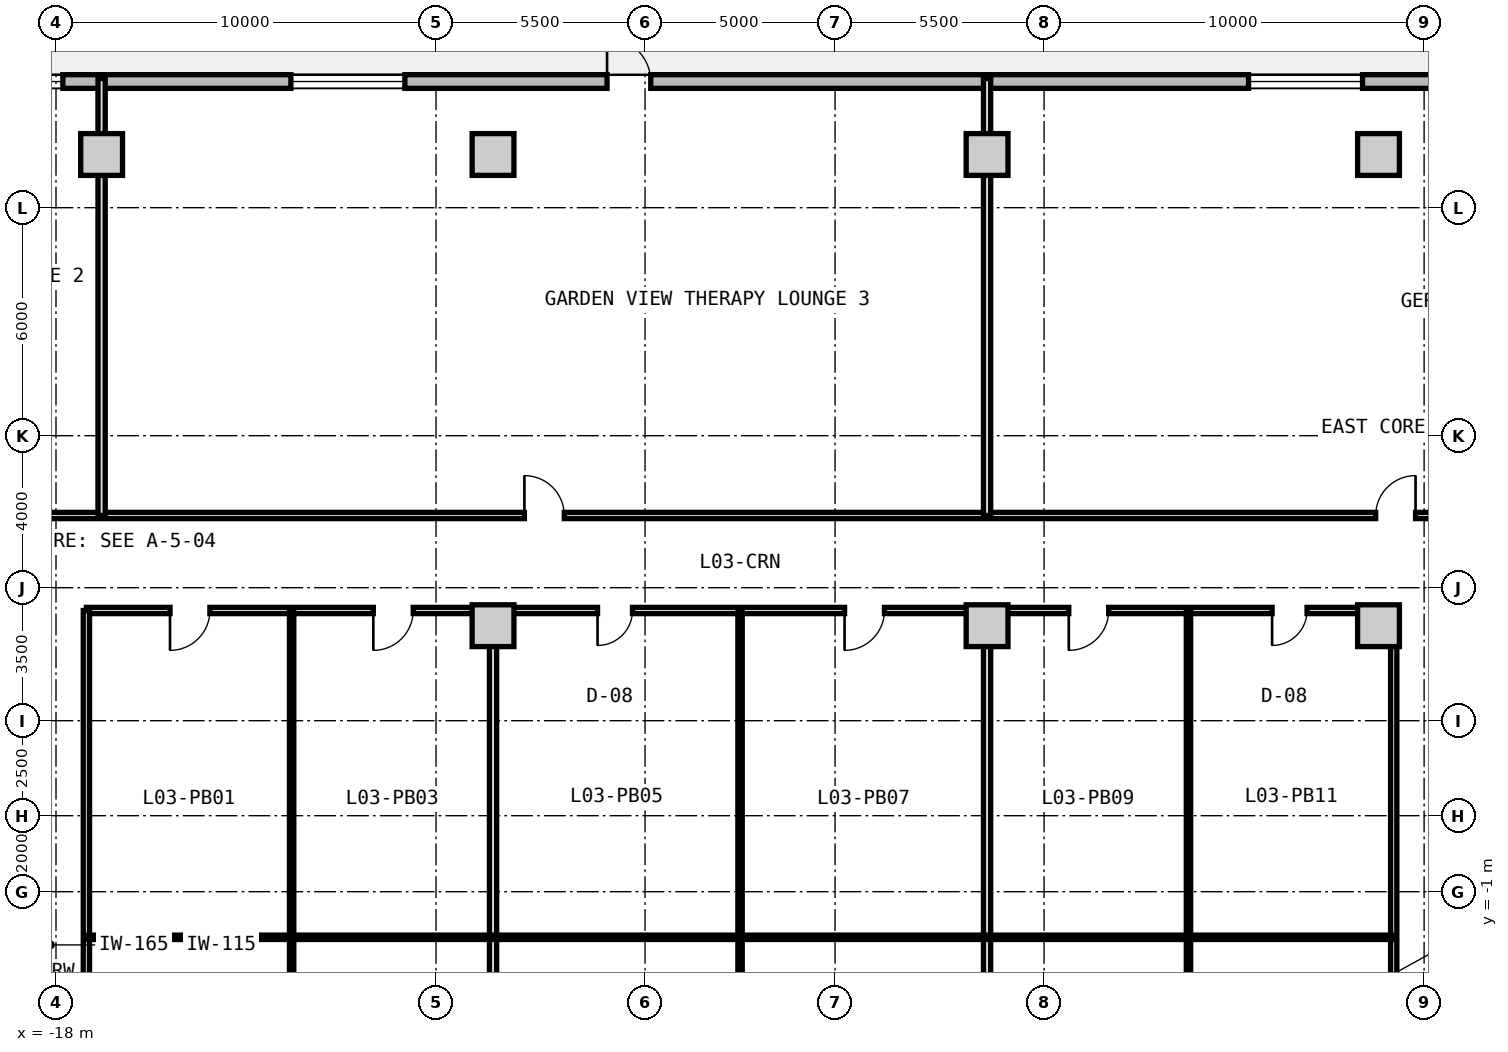
"""IFC4 building model, lengths in metres.
Left out: names, types, materials, properties, quantities, classifications, styles, units other than length and angle.
Written with IfcOpenShell. Run it as: python <this file> out.ifc"""

import sys

from ifc_helpers import new_model, si_unit, direction, frame, frame_2d, origin, origin_2d, place, context, subcontext, project, spatial, rectangle, extrude, source, transform, mapped, element, fill, save


model = new_model("IFC4")
c1 = context("Model", 3, precision=1e-05, world=origin(), true_north=direction((0.0, 1.0)))
c2 = subcontext(c1, "Body", "Model", "MODEL_VIEW")
j1 = project(units=[si_unit("LENGTHUNIT", "METRE"), si_unit("PLANEANGLEUNIT", "RADIAN")], contexts=[c1])
p1 = place(None, origin())
s1 = spatial("IfcSite", under=j1, at=p1, CompositionType="ELEMENT")
p2 = place(p1, origin())
s2 = spatial("IfcBuilding", under=s1, at=p2, CompositionType="ELEMENT")
p3 = place(p2, frame((0.0, 0.0, 12.6)))
s3 = spatial("IfcBuildingStorey", under=s2, at=p3, CompositionType="ELEMENT", Elevation=12.6)
m1 = source(origin(), c2, "Body", "SweptSolid", [
    extrude(rectangle(XDim=1.1, YDim=1.1, at=origin_2d()), origin(), (0.0, 0.0, 1.0), 4.2),
])
for number, where, z_axis, x_axis in (
    (1, (-16.8, 18.4, 0.0), (0.0, 0.0, 1.0), (1.0, 0.0, 0.0)),
    (2, (-6.5, 18.4, 0.0), (0.0, 0.0, 1.0), (1.0, 0.0, 0.0)),
    (3, (6.5, 18.4, 0.0), (0.0, 0.0, 1.0), (1.0, 0.0, 0.0)),
    (4, (16.8, 18.4, 0.0), (0.0, 0.0, 1.0), (1.0, 0.0, 0.0)),
    (5, (-6.5, 6.0, 0.0), (0.0, 0.0, 1.0), (1.0, 0.0, 0.0)),
    (6, (6.5, 6.0, 0.0), (0.0, 0.0, 1.0), (1.0, 0.0, 0.0)),
    (7, (16.8, 6.0, 0.0), (0.0, 0.0, 1.0), (1.0, 0.0, 0.0)),
):
    element("IfcColumn", number, at=place(p3, frame(where, z_axis=z_axis, x_axis=x_axis)), inside=s3, PredefinedType="COLUMN", context=c2, shape_type="MappedRepresentation", body=[
        mapped(m1, transform((0.0, 0.0, 0.0), x_axis=(1.0, 0.0, 0.0), y_axis=(0.0, 1.0, 0.0), z_axis=(0.0, 0.0, 1.0), scale=1.0)),
    ])
m2 = source(origin(), c2, "Body", "SweptSolid", [
    extrude(rectangle(XDim=98.84, YDim=0.36, at=frame_2d((49.42, 0.0))), origin(), (0.0, 0.0, 1.0), 3.88),
])
p4 = place(p3, frame((-49.42, 20.32, 0.0), z_axis=(0.0, 0.0, 1.0), x_axis=(1.0, 0.0, 0.0)))
e8 = element("IfcWall", 8, at=p4, inside=s3, PredefinedType="SOLIDWALL", context=c2, shape_type="MappedRepresentation", body=[
    mapped(m2, transform((0.0, 0.0, 0.0), x_axis=(1.0, 0.0, 0.0), y_axis=(0.0, 1.0, 0.0), z_axis=(0.0, 0.0, 1.0), scale=1.0)),
])
p5 = place(p4, frame((45.92, 0.0, 0.0)))
e9 = element("IfcOpeningElement", 9, at=p5, cuts=e8, PredefinedType="OPENING", context=c2, shape_type="SweptSolid", body=[
    extrude(rectangle(XDim=1.15, YDim=2.25, at=frame_2d((0.575, 1.125))), frame((0.0, 0.19, 0.0), z_axis=(0.0, -1.0, 0.0), x_axis=(1.0, 0.0, 0.0)), (0.0, 0.0, 1.0), 0.38),
])
p6 = place(p4, frame((4.0, 0.0, 0.85)))
e10 = element("IfcOpeningElement", 10, at=p6, cuts=e8, PredefinedType="OPENING", context=c2, shape_type="SweptSolid", body=[
    extrude(rectangle(XDim=2.4, YDim=2.2, at=frame_2d((1.2, 1.1))), frame((0.0, 0.19, 0.0), z_axis=(0.0, -1.0, 0.0), x_axis=(1.0, 0.0, 0.0)), (0.0, 0.0, 1.0), 0.38),
])
p7 = place(p4, frame((12.4, 0.0, 0.85)))
e11 = element("IfcOpeningElement", 11, at=p7, cuts=e8, PredefinedType="OPENING", context=c2, shape_type="SweptSolid", body=[
    extrude(rectangle(XDim=3.0, YDim=2.1, at=frame_2d((1.5, 1.05))), frame((0.0, 0.19, 0.0), z_axis=(0.0, -1.0, 0.0), x_axis=(1.0, 0.0, 0.0)), (0.0, 0.0, 1.0), 0.38),
])
p8 = place(p4, frame((29.2, 0.0, 0.85)))
e12 = element("IfcOpeningElement", 12, at=p8, cuts=e8, PredefinedType="OPENING", context=c2, shape_type="SweptSolid", body=[
    extrude(rectangle(XDim=2.4, YDim=2.2, at=frame_2d((1.2, 1.1))), frame((0.0, 0.19, 0.0), z_axis=(0.0, -1.0, 0.0), x_axis=(1.0, 0.0, 0.0)), (0.0, 0.0, 1.0), 0.38),
])
p9 = place(p4, frame((37.6, 0.0, 0.85)))
e13 = element("IfcOpeningElement", 13, at=p9, cuts=e8, PredefinedType="OPENING", context=c2, shape_type="SweptSolid", body=[
    extrude(rectangle(XDim=3.0, YDim=2.1, at=frame_2d((1.5, 1.05))), frame((0.0, 0.19, 0.0), z_axis=(0.0, -1.0, 0.0), x_axis=(1.0, 0.0, 0.0)), (0.0, 0.0, 1.0), 0.38),
])
p10 = place(p4, frame((62.8, 0.0, 0.85)))
e14 = element("IfcOpeningElement", 14, at=p10, cuts=e8, PredefinedType="OPENING", context=c2, shape_type="SweptSolid", body=[
    extrude(rectangle(XDim=3.0, YDim=2.1, at=frame_2d((1.5, 1.05))), frame((0.0, 0.19, 0.0), z_axis=(0.0, -1.0, 0.0), x_axis=(1.0, 0.0, 0.0)), (0.0, 0.0, 1.0), 0.38),
])
p11 = place(p4, frame((71.2, 0.0, 0.9)))
e15 = element("IfcOpeningElement", 15, at=p11, cuts=e8, PredefinedType="OPENING", context=c2, shape_type="SweptSolid", body=[
    extrude(rectangle(XDim=1.8, YDim=2.0, at=frame_2d((0.9, 1.0))), frame((0.0, 0.19, 0.0), z_axis=(0.0, -1.0, 0.0), x_axis=(1.0, 0.0, 0.0)), (0.0, 0.0, 1.0), 0.38),
])
p12 = place(p4, frame((79.6, 0.0, 0.85)))
e16 = element("IfcOpeningElement", 16, at=p12, cuts=e8, PredefinedType="OPENING", context=c2, shape_type="SweptSolid", body=[
    extrude(rectangle(XDim=2.4, YDim=2.2, at=frame_2d((1.2, 1.1))), frame((0.0, 0.19, 0.0), z_axis=(0.0, -1.0, 0.0), x_axis=(1.0, 0.0, 0.0)), (0.0, 0.0, 1.0), 0.38),
])
m3 = source(origin(), c2, "Body", "SweptSolid", [
    extrude(rectangle(XDim=34.4, YDim=0.165, at=frame_2d((17.2, 0.0))), origin(), (0.0, 0.0, 1.0), 3.865),
])
p13 = place(p3, frame((-17.2, 6.4, 0.0), z_axis=(0.0, 0.0, 1.0), x_axis=(1.0, 0.0, 0.0)))
e17 = element("IfcWall", 17, at=p13, inside=s3, PredefinedType="PARTITIONING", context=c2, shape_type="MappedRepresentation", body=[
    mapped(m3, transform((0.0, 0.0, 0.0), x_axis=(1.0, 0.0, 0.0), y_axis=(0.0, 1.0, 0.0), z_axis=(0.0, 0.0, 1.0), scale=1.0)),
])
p14 = place(p13, frame((2.2, 0.0, 0.0)))
e18 = element("IfcOpeningElement", 18, at=p14, cuts=e17, PredefinedType="OPENING", context=c2, shape_type="SweptSolid", body=[
    extrude(rectangle(XDim=1.05, YDim=2.15, at=frame_2d((0.525, 1.075))), frame((0.0, 0.093, 0.0), z_axis=(0.0, -1.0, 0.0), x_axis=(1.0, 0.0, 0.0)), (0.0, 0.0, 1.0), 0.185),
])
p15 = place(p13, frame((7.55, 0.0, 0.0)))
e19 = element("IfcOpeningElement", 19, at=p15, cuts=e17, PredefinedType="OPENING", context=c2, shape_type="SweptSolid", body=[
    extrude(rectangle(XDim=1.05, YDim=2.15, at=frame_2d((0.525, 1.075))), frame((0.0, 0.093, 0.0), z_axis=(0.0, -1.0, 0.0), x_axis=(1.0, 0.0, 0.0)), (0.0, 0.0, 1.0), 0.185),
])
p16 = place(p13, frame((13.45, 0.0, 0.0)))
e20 = element("IfcOpeningElement", 20, at=p16, cuts=e17, PredefinedType="OPENING", context=c2, shape_type="SweptSolid", body=[
    extrude(rectangle(XDim=0.92, YDim=2.1, at=frame_2d((0.46, 1.05))), frame((0.0, 0.093, 0.0), z_axis=(0.0, -1.0, 0.0), x_axis=(1.0, 0.0, 0.0)), (0.0, 0.0, 1.0), 0.185),
])
p17 = place(p13, frame((19.95, 0.0, 0.0)))
e21 = element("IfcOpeningElement", 21, at=p17, cuts=e17, PredefinedType="OPENING", context=c2, shape_type="SweptSolid", body=[
    extrude(rectangle(XDim=1.05, YDim=2.15, at=frame_2d((0.525, 1.075))), frame((0.0, 0.093, 0.0), z_axis=(0.0, -1.0, 0.0), x_axis=(1.0, 0.0, 0.0)), (0.0, 0.0, 1.0), 0.185),
])
p18 = place(p13, frame((25.85, 0.0, 0.0)))
e22 = element("IfcOpeningElement", 22, at=p18, cuts=e17, PredefinedType="OPENING", context=c2, shape_type="SweptSolid", body=[
    extrude(rectangle(XDim=1.05, YDim=2.15, at=frame_2d((0.525, 1.075))), frame((0.0, 0.093, 0.0), z_axis=(0.0, -1.0, 0.0), x_axis=(1.0, 0.0, 0.0)), (0.0, 0.0, 1.0), 0.185),
])
p19 = place(p13, frame((31.2, 0.0, 0.0)))
e23 = element("IfcOpeningElement", 23, at=p19, cuts=e17, PredefinedType="OPENING", context=c2, shape_type="SweptSolid", body=[
    extrude(rectangle(XDim=0.92, YDim=2.1, at=frame_2d((0.46, 1.05))), frame((0.0, 0.093, 0.0), z_axis=(0.0, -1.0, 0.0), x_axis=(1.0, 0.0, 0.0)), (0.0, 0.0, 1.0), 0.185),
])
m4 = source(origin(), c2, "Body", "SweptSolid", [
    extrude(rectangle(XDim=17.6, YDim=0.165, at=frame_2d((8.8, 0.0))), origin(), (0.0, 0.0, 1.0), 3.865),
])
for number, where, z_axis, x_axis in (
    (24, (-17.2, -11.2, 0.0), (0.0, 0.0, 1.0), (0.0, 1.0, 0.0)),
    (25, (17.2, -11.2, 0.0), (0.0, 0.0, 1.0), (0.0, 1.0, 0.0)),
):
    element("IfcWall", number, at=place(p3, frame(where, z_axis=z_axis, x_axis=x_axis)), inside=s3, PredefinedType="PARTITIONING", context=c2, shape_type="MappedRepresentation", body=[
        mapped(m4, transform((0.0, 0.0, 0.0), x_axis=(1.0, 0.0, 0.0), y_axis=(0.0, 1.0, 0.0), z_axis=(0.0, 0.0, 1.0), scale=1.0)),
    ])
m5 = source(origin(), c2, "Body", "SweptSolid", [
    extrude(rectangle(XDim=17.6, YDim=0.19, at=frame_2d((8.8, 0.0))), origin(), (0.0, 0.0, 1.0), 3.215),
])
for number, where, z_axis, x_axis in (
    (26, (-6.5, -11.2, 0.0), (0.0, 0.0, 1.0), (0.0, 1.0, 0.0)),
    (27, (6.5, -11.2, 0.0), (0.0, 0.0, 1.0), (0.0, 1.0, 0.0)),
):
    element("IfcWall", number, at=place(p3, frame(where, z_axis=z_axis, x_axis=x_axis)), inside=s3, PredefinedType="PARTITIONING", context=c2, shape_type="MappedRepresentation", body=[
        mapped(m5, transform((0.0, 0.0, 0.0), x_axis=(1.0, 0.0, 0.0), y_axis=(0.0, 1.0, 0.0), z_axis=(0.0, 0.0, 1.0), scale=1.0)),
    ])
m6 = source(origin(), c2, "Body", "SweptSolid", [
    extrude(rectangle(XDim=17.6, YDim=0.115, at=frame_2d((8.8, 0.0))), origin(), (0.0, 0.0, 1.0), 3.865),
])
for number, where, z_axis, x_axis in (
    (28, (-11.8, -11.2, 0.0), (0.0, 0.0, 1.0), (0.0, 1.0, 0.0)),
    (29, (0.0, -11.2, 0.0), (0.0, 0.0, 1.0), (0.0, 1.0, 0.0)),
    (30, (11.8, -11.2, 0.0), (0.0, 0.0, 1.0), (0.0, 1.0, 0.0)),
):
    element("IfcWall", number, at=place(p3, frame(where, z_axis=z_axis, x_axis=x_axis)), inside=s3, PredefinedType="PARTITIONING", context=c2, shape_type="MappedRepresentation", body=[
        mapped(m6, transform((0.0, 0.0, 0.0), x_axis=(1.0, 0.0, 0.0), y_axis=(0.0, 1.0, 0.0), z_axis=(0.0, 0.0, 1.0), scale=1.0)),
    ])
m7 = source(origin(), c2, "Body", "SweptSolid", [
    extrude(rectangle(XDim=34.4, YDim=0.115, at=frame_2d((17.2, 0.0))), origin(), (0.0, 0.0, 1.0), 3.865),
])
p20 = place(p3, frame((-17.2, -2.2, 0.0), z_axis=(0.0, 0.0, 1.0), x_axis=(1.0, 0.0, 0.0)))
e31 = element("IfcWall", 31, at=p20, inside=s3, PredefinedType="PARTITIONING", context=c2, shape_type="MappedRepresentation", body=[
    mapped(m7, transform((0.0, 0.0, 0.0), x_axis=(1.0, 0.0, 0.0), y_axis=(0.0, 1.0, 0.0), z_axis=(0.0, 0.0, 1.0), scale=1.0)),
])
m8 = source(origin(), c2, "Body", "SweptSolid", [
    extrude(rectangle(XDim=98.9, YDim=0.165, at=frame_2d((49.45, 0.0))), origin(), (0.0, 0.0, 1.0), 3.865),
])
p21 = place(p3, frame((-49.45, 8.9, 0.0), z_axis=(0.0, 0.0, 1.0), x_axis=(1.0, 0.0, 0.0)))
e32 = element("IfcWall", 32, at=p21, inside=s3, PredefinedType="PARTITIONING", context=c2, shape_type="MappedRepresentation", body=[
    mapped(m8, transform((0.0, 0.0, 0.0), x_axis=(1.0, 0.0, 0.0), y_axis=(0.0, 1.0, 0.0), z_axis=(0.0, 0.0, 1.0), scale=1.0)),
])
p22 = place(p21, frame((10.325, 0.0, 0.0)))
e33 = element("IfcOpeningElement", 33, at=p22, cuts=e32, PredefinedType="OPENING", context=c2, shape_type="SweptSolid", body=[
    extrude(rectangle(XDim=1.05, YDim=2.15, at=frame_2d((0.525, 1.075))), frame((0.0, 0.093, 0.0), z_axis=(0.0, -1.0, 0.0), x_axis=(1.0, 0.0, 0.0)), (0.0, 0.0, 1.0), 0.185),
])
p23 = place(p21, frame((26.525, 0.0, 0.0)))
e34 = element("IfcOpeningElement", 34, at=p23, cuts=e32, PredefinedType="OPENING", context=c2, shape_type="SweptSolid", body=[
    extrude(rectangle(XDim=1.05, YDim=2.15, at=frame_2d((0.525, 1.075))), frame((0.0, 0.093, 0.0), z_axis=(0.0, -1.0, 0.0), x_axis=(1.0, 0.0, 0.0)), (0.0, 0.0, 1.0), 0.185),
])
p24 = place(p21, frame((43.775, 0.0, 0.0)))
e35 = element("IfcOpeningElement", 35, at=p24, cuts=e32, PredefinedType="OPENING", context=c2, shape_type="SweptSolid", body=[
    extrude(rectangle(XDim=1.05, YDim=2.15, at=frame_2d((0.525, 1.075))), frame((0.0, 0.093, 0.0), z_axis=(0.0, -1.0, 0.0), x_axis=(1.0, 0.0, 0.0)), (0.0, 0.0, 1.0), 0.185),
])
p25 = place(p21, frame((66.175, 0.0, 0.0)))
e36 = element("IfcOpeningElement", 36, at=p25, cuts=e32, PredefinedType="OPENING", context=c2, shape_type="SweptSolid", body=[
    extrude(rectangle(XDim=1.05, YDim=2.15, at=frame_2d((0.525, 1.075))), frame((0.0, 0.093, 0.0), z_axis=(0.0, -1.0, 0.0), x_axis=(1.0, 0.0, 0.0)), (0.0, 0.0, 1.0), 0.185),
])
p26 = place(p21, frame((87.525, 0.0, 0.0)))
e37 = element("IfcOpeningElement", 37, at=p26, cuts=e32, PredefinedType="OPENING", context=c2, shape_type="SweptSolid", body=[
    extrude(rectangle(XDim=1.05, YDim=2.15, at=frame_2d((0.525, 1.075))), frame((0.0, 0.093, 0.0), z_axis=(0.0, -1.0, 0.0), x_axis=(1.0, 0.0, 0.0)), (0.0, 0.0, 1.0), 0.185),
])
m9 = source(origin(), c2, "Body", "SweptSolid", [
    extrude(rectangle(XDim=11.5, YDim=0.19, at=frame_2d((5.75, 0.0))), origin(), (0.0, 0.0, 1.0), 3.865),
])
p27 = place(p3, frame((-16.8, 8.9, 0.0), z_axis=(0.0, 0.0, 1.0), x_axis=(0.0, 1.0, 0.0)))
e38 = element("IfcWall", 38, at=p27, inside=s3, PredefinedType="PARTITIONING", context=c2, shape_type="MappedRepresentation", body=[
    mapped(m9, transform((0.0, 0.0, 0.0), x_axis=(1.0, 0.0, 0.0), y_axis=(0.0, 1.0, 0.0), z_axis=(0.0, 0.0, 1.0), scale=1.0)),
])
m10 = source(origin(), c2, "Body", "SweptSolid", [
    extrude(rectangle(XDim=11.5, YDim=0.19, at=frame_2d((5.75, 0.0))), origin(), (0.0, 0.0, 1.0), 3.215),
])
p28 = place(p3, frame((6.5, 8.9, 0.0), z_axis=(0.0, 0.0, 1.0), x_axis=(0.0, 1.0, 0.0)))
e39 = element("IfcWall", 39, at=p28, inside=s3, PredefinedType="PARTITIONING", context=c2, shape_type="MappedRepresentation", body=[
    mapped(m10, transform((0.0, 0.0, 0.0), x_axis=(1.0, 0.0, 0.0), y_axis=(0.0, 1.0, 0.0), z_axis=(0.0, 0.0, 1.0), scale=1.0)),
])
m11 = source(origin(), c2, "Body", "SweptSolid", [
    extrude(rectangle(XDim=1.15, YDim=2.25, at=frame_2d((0.575, 1.125))), frame((0.0, 0.025, 0.0), z_axis=(0.0, -1.0, 0.0), x_axis=(1.0, 0.0, 0.0)), (0.0, 0.0, 1.0), 0.05),
])
p29 = place(p5, origin())
e40 = element("IfcDoor", 40, at=p29, inside=s3, OperationType="SINGLE_SWING_LEFT", PredefinedType="DOOR", context=c2, shape_type="MappedRepresentation", body=[
    mapped(m11, transform((0.0, 0.0, 0.0), x_axis=(1.0, 0.0, 0.0), y_axis=(0.0, 1.0, 0.0), z_axis=(0.0, 0.0, 1.0), scale=1.0)),
])
fill(e9, e40)
m12 = source(origin(), c2, "Body", "SweptSolid", [
    extrude(rectangle(XDim=2.4, YDim=2.2, at=frame_2d((1.2, 1.1))), frame((0.0, 0.03, 0.0), z_axis=(0.0, -1.0, 0.0), x_axis=(1.0, 0.0, 0.0)), (0.0, 0.0, 1.0), 0.06),
])
p30 = place(p8, origin())
e41 = element("IfcWindow", 41, at=p30, inside=s3, PartitioningType="SINGLE_PANEL", PredefinedType="WINDOW", context=c2, shape_type="MappedRepresentation", body=[
    mapped(m12, transform((0.0, 0.0, 0.0), x_axis=(1.0, 0.0, 0.0), y_axis=(0.0, 1.0, 0.0), z_axis=(0.0, 0.0, 1.0), scale=1.0)),
])
fill(e12, e41)
m13 = source(origin(), c2, "Body", "SweptSolid", [
    extrude(rectangle(XDim=3.0, YDim=2.1, at=frame_2d((1.5, 1.05))), frame((0.0, 0.03, 0.0), z_axis=(0.0, -1.0, 0.0), x_axis=(1.0, 0.0, 0.0)), (0.0, 0.0, 1.0), 0.06),
])
p31 = place(p9, origin())
e42 = element("IfcWindow", 42, at=p31, inside=s3, PartitioningType="SINGLE_PANEL", PredefinedType="WINDOW", context=c2, shape_type="MappedRepresentation", body=[
    mapped(m13, transform((0.0, 0.0, 0.0), x_axis=(1.0, 0.0, 0.0), y_axis=(0.0, 1.0, 0.0), z_axis=(0.0, 0.0, 1.0), scale=1.0)),
])
fill(e13, e42)
p32 = place(p10, origin())
e43 = element("IfcWindow", 43, at=p32, inside=s3, PartitioningType="SINGLE_PANEL", PredefinedType="WINDOW", context=c2, shape_type="MappedRepresentation", body=[
    mapped(m13, transform((0.0, 0.0, 0.0), x_axis=(1.0, 0.0, 0.0), y_axis=(0.0, 1.0, 0.0), z_axis=(0.0, 0.0, 1.0), scale=1.0)),
])
fill(e14, e43)
m14 = source(origin(), c2, "Body", "SweptSolid", [
    extrude(rectangle(XDim=1.05, YDim=2.15, at=frame_2d((0.525, 1.075))), frame((0.0, 0.025, 0.0), z_axis=(0.0, -1.0, 0.0), x_axis=(1.0, 0.0, 0.0)), (0.0, 0.0, 1.0), 0.05),
])
p33 = place(p14, frame((1.05, 0.0, 0.0), z_axis=(0.0, 0.0, 1.0), x_axis=(-1.0, 0.0, 0.0)))
e44 = element("IfcDoor", 44, at=p33, inside=s3, OperationType="SINGLE_SWING_RIGHT", PredefinedType="DOOR", context=c2, shape_type="MappedRepresentation", body=[
    mapped(m14, transform((0.0, 0.0, 0.0), x_axis=(1.0, 0.0, 0.0), y_axis=(0.0, 1.0, 0.0), z_axis=(0.0, 0.0, 1.0), scale=1.0)),
])
fill(e18, e44)
p34 = place(p15, frame((1.05, 0.0, 0.0), z_axis=(0.0, 0.0, 1.0), x_axis=(-1.0, 0.0, 0.0)))
e45 = element("IfcDoor", 45, at=p34, inside=s3, OperationType="SINGLE_SWING_RIGHT", PredefinedType="DOOR", context=c2, shape_type="MappedRepresentation", body=[
    mapped(m14, transform((0.0, 0.0, 0.0), x_axis=(1.0, 0.0, 0.0), y_axis=(0.0, 1.0, 0.0), z_axis=(0.0, 0.0, 1.0), scale=1.0)),
])
fill(e19, e45)
m15 = source(origin(), c2, "Body", "SweptSolid", [
    extrude(rectangle(XDim=0.92, YDim=2.1, at=frame_2d((0.46, 1.05))), frame((0.0, 0.025, 0.0), z_axis=(0.0, -1.0, 0.0), x_axis=(1.0, 0.0, 0.0)), (0.0, 0.0, 1.0), 0.05),
])
p35 = place(p16, frame((0.92, 0.0, 0.0), z_axis=(0.0, 0.0, 1.0), x_axis=(-1.0, 0.0, 0.0)))
e46 = element("IfcDoor", 46, at=p35, inside=s3, OperationType="SINGLE_SWING_RIGHT", PredefinedType="DOOR", context=c2, shape_type="MappedRepresentation", body=[
    mapped(m15, transform((0.0, 0.0, 0.0), x_axis=(1.0, 0.0, 0.0), y_axis=(0.0, 1.0, 0.0), z_axis=(0.0, 0.0, 1.0), scale=1.0)),
])
fill(e20, e46)
p36 = place(p17, frame((1.05, 0.0, 0.0), z_axis=(0.0, 0.0, 1.0), x_axis=(-1.0, 0.0, 0.0)))
e47 = element("IfcDoor", 47, at=p36, inside=s3, OperationType="SINGLE_SWING_RIGHT", PredefinedType="DOOR", context=c2, shape_type="MappedRepresentation", body=[
    mapped(m14, transform((0.0, 0.0, 0.0), x_axis=(1.0, 0.0, 0.0), y_axis=(0.0, 1.0, 0.0), z_axis=(0.0, 0.0, 1.0), scale=1.0)),
])
fill(e21, e47)
p37 = place(p18, frame((1.05, 0.0, 0.0), z_axis=(0.0, 0.0, 1.0), x_axis=(-1.0, 0.0, 0.0)))
e48 = element("IfcDoor", 48, at=p37, inside=s3, OperationType="SINGLE_SWING_RIGHT", PredefinedType="DOOR", context=c2, shape_type="MappedRepresentation", body=[
    mapped(m14, transform((0.0, 0.0, 0.0), x_axis=(1.0, 0.0, 0.0), y_axis=(0.0, 1.0, 0.0), z_axis=(0.0, 0.0, 1.0), scale=1.0)),
])
fill(e22, e48)
p38 = place(p19, frame((0.92, 0.0, 0.0), z_axis=(0.0, 0.0, 1.0), x_axis=(-1.0, 0.0, 0.0)))
e49 = element("IfcDoor", 49, at=p38, inside=s3, OperationType="SINGLE_SWING_RIGHT", PredefinedType="DOOR", context=c2, shape_type="MappedRepresentation", body=[
    mapped(m15, transform((0.0, 0.0, 0.0), x_axis=(1.0, 0.0, 0.0), y_axis=(0.0, 1.0, 0.0), z_axis=(0.0, 0.0, 1.0), scale=1.0)),
])
fill(e23, e49)
p39 = place(p24, origin())
e50 = element("IfcDoor", 50, at=p39, inside=s3, OperationType="SINGLE_SWING_LEFT", PredefinedType="DOOR", context=c2, shape_type="MappedRepresentation", body=[
    mapped(m14, transform((0.0, 0.0, 0.0), x_axis=(1.0, 0.0, 0.0), y_axis=(0.0, 1.0, 0.0), z_axis=(0.0, 0.0, 1.0), scale=1.0)),
])
fill(e35, e50)
p40 = place(p25, origin())
e51 = element("IfcDoor", 51, at=p40, inside=s3, OperationType="SINGLE_SWING_RIGHT", PredefinedType="DOOR", context=c2, shape_type="MappedRepresentation", body=[
    mapped(m14, transform((0.0, 0.0, 0.0), x_axis=(1.0, 0.0, 0.0), y_axis=(0.0, 1.0, 0.0), z_axis=(0.0, 0.0, 1.0), scale=1.0)),
])
fill(e36, e51)
save(model, sys.argv[1])
